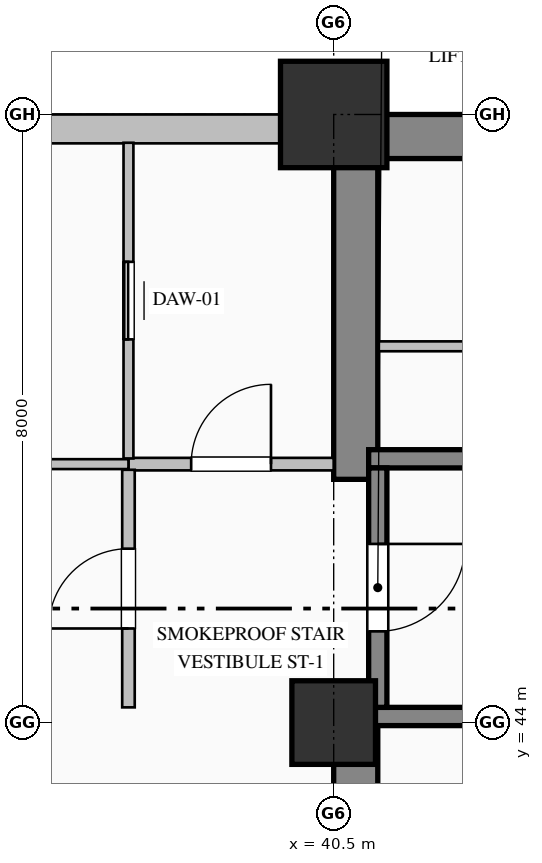
"""IFC4 building model, lengths in metres.
Left out: names, types, materials, properties, quantities, classifications, styles, units other than length and angle.
Written with IfcOpenShell. Run it as: python <this file> out.ifc"""

import sys

from ifc_helpers import new_model, si_unit, direction, frame, frame_2d, origin, origin_2d, place, context, subcontext, project, spatial, rectangle, hollow_rectangle, extrude, element, fill, save


model = new_model("IFC4")
c1 = context("Model", 3, precision=1e-05, world=origin(), true_north=direction((0.0, 1.0)))
c2 = subcontext(c1, "Body", "Model", "MODEL_VIEW")
j1 = project(units=[si_unit("LENGTHUNIT", "METRE"), si_unit("PLANEANGLEUNIT", "RADIAN")], contexts=[c1])
p1 = place(None, origin())
s1 = spatial("IfcSite", under=j1, at=p1, CompositionType="ELEMENT")
p2 = place(p1, origin())
s2 = spatial("IfcBuilding", under=s1, at=p2, CompositionType="ELEMENT")
p3 = place(p2, frame((0.0, 0.0, 6.0)))
s3 = spatial("IfcBuildingStorey", under=s2, at=p3, CompositionType="ELEMENT", Elevation=6.0)
p4 = place(p3, frame((40.5, 51.71, 0.0), z_axis=(0.0, 0.0, 1.0), x_axis=(1.0, 0.0, 0.0)))
e1 = element("IfcWall", 1, at=p4, inside=s3, PredefinedType="SHEAR", context=c2, shape_type="SweptSolid", body=[
    extrude(rectangle(XDim=23.5, YDim=0.58, at=frame_2d((11.75, 0.0))), origin(), (0.0, 0.0, 1.0), 5.12),
])
p5 = place(p3, frame((40.79, 36.58, 0.0), z_axis=(0.0, 0.0, 1.0), x_axis=(0.0, 1.0, 0.0)))
e2 = element("IfcWall", 2, at=p5, inside=s3, PredefinedType="SHEAR", context=c2, shape_type="SweptSolid", body=[
    extrude(rectangle(XDim=7.82, YDim=0.58, at=frame_2d((3.91, 0.0))), origin(), (0.0, 0.0, 1.0), 5.12),
])
p6 = place(p3, frame((40.79, 47.2, 0.0), z_axis=(0.0, 0.0, 1.0), x_axis=(0.0, 1.0, 0.0)))
e3 = element("IfcWall", 3, at=p6, inside=s3, PredefinedType="SHEAR", context=c2, shape_type="SweptSolid", body=[
    extrude(rectangle(XDim=4.22, YDim=0.58, at=frame_2d((2.11, 0.0))), origin(), (0.0, 0.0, 1.0), 5.12),
])
p7 = place(p3, frame((40.5, 44.0, 0.0), z_axis=(0.0, 0.0, 1.0), x_axis=(1.0, 0.0, 0.0)))
e4 = element("IfcColumn", 4, at=p7, inside=s3, PredefinedType="COLUMN", context=c2, shape_type="SweptSolid", body=[
    extrude(rectangle(XDim=1.1, YDim=1.1, at=origin_2d()), origin(), (0.0, 0.0, 1.0), 5.4),
])
p8 = place(p3, frame((40.5, 52.0, 0.0), z_axis=(0.0, 0.0, 1.0), x_axis=(1.0, 0.0, 0.0)))
e5 = element("IfcColumn", 5, at=p8, inside=s3, PredefinedType="COLUMN", context=c2, shape_type="SweptSolid", body=[
    extrude(hollow_rectangle(XDim=1.4, YDim=1.4, WallThickness=0.05, at=origin_2d()), origin(), (0.0, 0.0, 1.0), 5.4),
])
p9 = place(p3, frame((4.0, 51.81, 0.0), z_axis=(0.0, 0.0, 1.0), x_axis=(1.0, 0.0, 0.0)))
e6 = element("IfcWall", 6, at=p9, inside=s3, PredefinedType="SOLIDWALL", context=c2, shape_type="SweptSolid", body=[
    extrude(rectangle(XDim=36.52, YDim=0.38, at=frame_2d((18.26, 0.0))), origin(), (0.0, 0.0, 1.0), 4.62),
])
p10 = place(p9, frame((16.7, 0.0, 0.85)))
e7 = element("IfcOpeningElement", 7, at=p10, cuts=e6, PredefinedType="OPENING", context=c2, shape_type="SweptSolid", body=[
    extrude(rectangle(XDim=2.6, YDim=3.1, at=frame_2d((1.3, 1.55))), frame((0.0, 0.2, 0.0), z_axis=(0.0, -1.0, 0.0), x_axis=(1.0, 0.0, 0.0)), (0.0, 0.0, 1.0), 0.4),
])
p11 = place(p9, frame((24.1, 0.0, 0.9)))
e8 = element("IfcOpeningElement", 8, at=p11, cuts=e6, PredefinedType="OPENING", context=c2, shape_type="SweptSolid", body=[
    extrude(rectangle(XDim=2.2, YDim=2.65, at=frame_2d((1.1, 1.325))), frame((0.0, 0.2, 0.0), z_axis=(0.0, -1.0, 0.0), x_axis=(1.0, 0.0, 0.0)), (0.0, 0.0, 1.0), 0.4),
])
for number, where, z_axis, x_axis in (
    (9, (40.96, 47.47, 0.0), (0.0, 0.0, 1.0), (1.0, 0.0, 0.0)),
    (10, (49.04, 44.08, 0.0), (0.0, 0.0, 1.0), (-1.0, 0.0, 0.0)),
):
    element("IfcWall", number, at=place(p3, frame(where, z_axis=z_axis, x_axis=x_axis)), inside=s3, PredefinedType="SOLIDWALL", context=c2, shape_type="SweptSolid", body=[
        extrude(rectangle(XDim=8.08, YDim=0.24, at=frame_2d((4.04, 0.0))), origin(), (0.0, 0.0, 1.0), 5.4),
    ])
p12 = place(p3, frame((41.08, 47.35, 0.0), z_axis=(0.0, 0.0, 1.0), x_axis=(0.0, -1.0, 0.0)))
e11 = element("IfcWall", 11, at=p12, inside=s3, PredefinedType="SOLIDWALL", context=c2, shape_type="SweptSolid", body=[
    extrude(rectangle(XDim=3.15, YDim=0.24, at=frame_2d((1.575, 0.0))), origin(), (0.0, 0.0, 1.0), 5.4),
])
p13 = place(p12, frame((1.0, 0.0, 0.0)))
e12 = element("IfcOpeningElement", 12, at=p13, cuts=e11, PredefinedType="OPENING", context=c2, shape_type="SweptSolid", body=[
    extrude(rectangle(XDim=1.15, YDim=2.2, at=frame_2d((0.575, 1.1))), frame((0.0, 0.13, 0.0), z_axis=(0.0, -1.0, 0.0), x_axis=(1.0, 0.0, 0.0)), (0.0, 0.0, 1.0), 0.26),
])
p14 = place(p3, frame((37.8, 47.4, 0.0), z_axis=(0.0, 0.0, 1.0), x_axis=(1.0, 0.0, 0.0)))
e13 = element("IfcWall", 13, at=p14, inside=s3, PredefinedType="PARTITIONING", context=c2, shape_type="SweptSolid", body=[
    extrude(rectangle(XDim=2.7, YDim=0.165, at=frame_2d((1.35, 0.0))), origin(), (0.0, 0.0, 1.0), 5.12),
])
p15 = place(p14, frame((0.825, 0.0, 0.0)))
e14 = element("IfcOpeningElement", 14, at=p15, cuts=e13, PredefinedType="OPENING", context=c2, shape_type="SweptSolid", body=[
    extrude(rectangle(XDim=1.05, YDim=2.15, at=frame_2d((0.525, 1.075))), frame((0.0, 0.093, 0.0), z_axis=(0.0, -1.0, 0.0), x_axis=(1.0, 0.0, 0.0)), (0.0, 0.0, 1.0), 0.185),
])
p16 = place(p3, frame((37.8, 44.2, 0.0), z_axis=(0.0, 0.0, 1.0), x_axis=(0.0, 1.0, 0.0)))
e15 = element("IfcWall", 15, at=p16, inside=s3, PredefinedType="PARTITIONING", context=c2, shape_type="SweptSolid", body=[
    extrude(rectangle(XDim=3.125, YDim=0.165, at=frame_2d((1.563, 0.0))), origin(), (0.0, 0.0, 1.0), 5.12),
])
p17 = place(p16, frame((1.038, 0.0, 0.0)))
e16 = element("IfcOpeningElement", 16, at=p17, cuts=e15, PredefinedType="OPENING", context=c2, shape_type="SweptSolid", body=[
    extrude(rectangle(XDim=1.05, YDim=2.15, at=frame_2d((0.525, 1.075))), frame((0.0, 0.093, 0.0), z_axis=(0.0, -1.0, 0.0), x_axis=(1.0, 0.0, 0.0)), (0.0, 0.0, 1.0), 0.185),
])
p18 = place(p3, frame((37.8, 47.475, 0.0), z_axis=(0.0, 0.0, 1.0), x_axis=(0.0, 1.0, 0.0)))
e17 = element("IfcWall", 17, at=p18, inside=s3, PredefinedType="PARTITIONING", context=c2, shape_type="SweptSolid", body=[
    extrude(rectangle(XDim=4.153, YDim=0.13, at=frame_2d((2.077, 0.0))), origin(), (0.0, 0.0, 1.0), 5.12),
])
p19 = place(p18, frame((1.567, 0.0, 0.0)))
e18 = element("IfcOpeningElement", 18, at=p19, cuts=e17, PredefinedType="OPENING", context=c2, shape_type="SweptSolid", body=[
    extrude(rectangle(XDim=1.02, YDim=2.15, at=frame_2d((0.51, 1.075))), frame((0.0, 0.075, 0.0), z_axis=(0.0, -1.0, 0.0), x_axis=(1.0, 0.0, 0.0)), (0.0, 0.0, 1.0), 0.15),
])
p20 = place(p3, frame((37.8, 47.4, 0.0), z_axis=(0.0, 0.0, 1.0), x_axis=(-1.0, 0.0, 0.0)))
e19 = element("IfcWall", 19, at=p20, inside=s3, PredefinedType="PARTITIONING", context=c2, shape_type="SweptSolid", body=[
    extrude(rectangle(XDim=2.4, YDim=0.13, at=frame_2d((1.2, 0.0))), origin(), (0.0, 0.0, 1.0), 5.12),
])
p21 = place(p3, frame((41.08, 48.95, 0.0), z_axis=(0.0, 0.0, 1.0), x_axis=(1.0, 0.0, 0.0)))
e20 = element("IfcWall", 20, at=p21, inside=s3, PredefinedType="PARTITIONING", context=c2, shape_type="SweptSolid", body=[
    extrude(rectangle(XDim=5.72, YDim=0.13, at=frame_2d((2.86, 0.0))), origin(), (0.0, 0.0, 1.0), 5.12),
])
p22 = place(p21, frame((2.4, 0.0, 0.0)))
e21 = element("IfcOpeningElement", 21, at=p22, cuts=e20, PredefinedType="OPENING", context=c2, shape_type="SweptSolid", body=[
    extrude(rectangle(XDim=0.92, YDim=2.15, at=frame_2d((0.46, 1.075))), frame((0.0, 0.075, 0.0), z_axis=(0.0, -1.0, 0.0), x_axis=(1.0, 0.0, 0.0)), (0.0, 0.0, 1.0), 0.15),
])
p23 = place(p13, origin())
e22 = element("IfcDoor", 22, at=p23, inside=s3, OperationType="SINGLE_SWING_LEFT", PredefinedType="DOOR", context=c2, shape_type="SweptSolid", body=[
    extrude(rectangle(XDim=1.15, YDim=2.2, at=frame_2d((0.575, 1.1))), frame((0.0, 0.025, 0.0), z_axis=(0.0, -1.0, 0.0), x_axis=(1.0, 0.0, 0.0)), (0.0, 0.0, 1.0), 0.05),
])
fill(e12, e22)
p24 = place(p17, origin())
e23 = element("IfcDoor", 23, at=p24, inside=s3, OperationType="SINGLE_SWING_LEFT", PredefinedType="DOOR", context=c2, shape_type="SweptSolid", body=[
    extrude(rectangle(XDim=1.05, YDim=2.15, at=frame_2d((0.525, 1.075))), frame((0.0, 0.025, 0.0), z_axis=(0.0, -1.0, 0.0), x_axis=(1.0, 0.0, 0.0)), (0.0, 0.0, 1.0), 0.05),
])
fill(e16, e23)
p25 = place(p15, origin())
e24 = element("IfcDoor", 24, at=p25, inside=s3, OperationType="SINGLE_SWING_RIGHT", PredefinedType="DOOR", context=c2, shape_type="SweptSolid", body=[
    extrude(rectangle(XDim=1.05, YDim=2.15, at=frame_2d((0.525, 1.075))), frame((0.0, 0.025, 0.0), z_axis=(0.0, -1.0, 0.0), x_axis=(1.0, 0.0, 0.0)), (0.0, 0.0, 1.0), 0.05),
])
fill(e14, e24)
p26 = place(p19, origin())
e25 = element("IfcDoor", 25, at=p26, inside=s3, OperationType="SLIDING_TO_LEFT", PredefinedType="DOOR", context=c2, shape_type="SweptSolid", body=[
    extrude(rectangle(XDim=1.02, YDim=2.15, at=frame_2d((0.51, 1.075))), frame((0.0, 0.025, 0.0), z_axis=(0.0, -1.0, 0.0), x_axis=(1.0, 0.0, 0.0)), (0.0, 0.0, 1.0), 0.05),
])
fill(e18, e25)
save(model, sys.argv[1])
